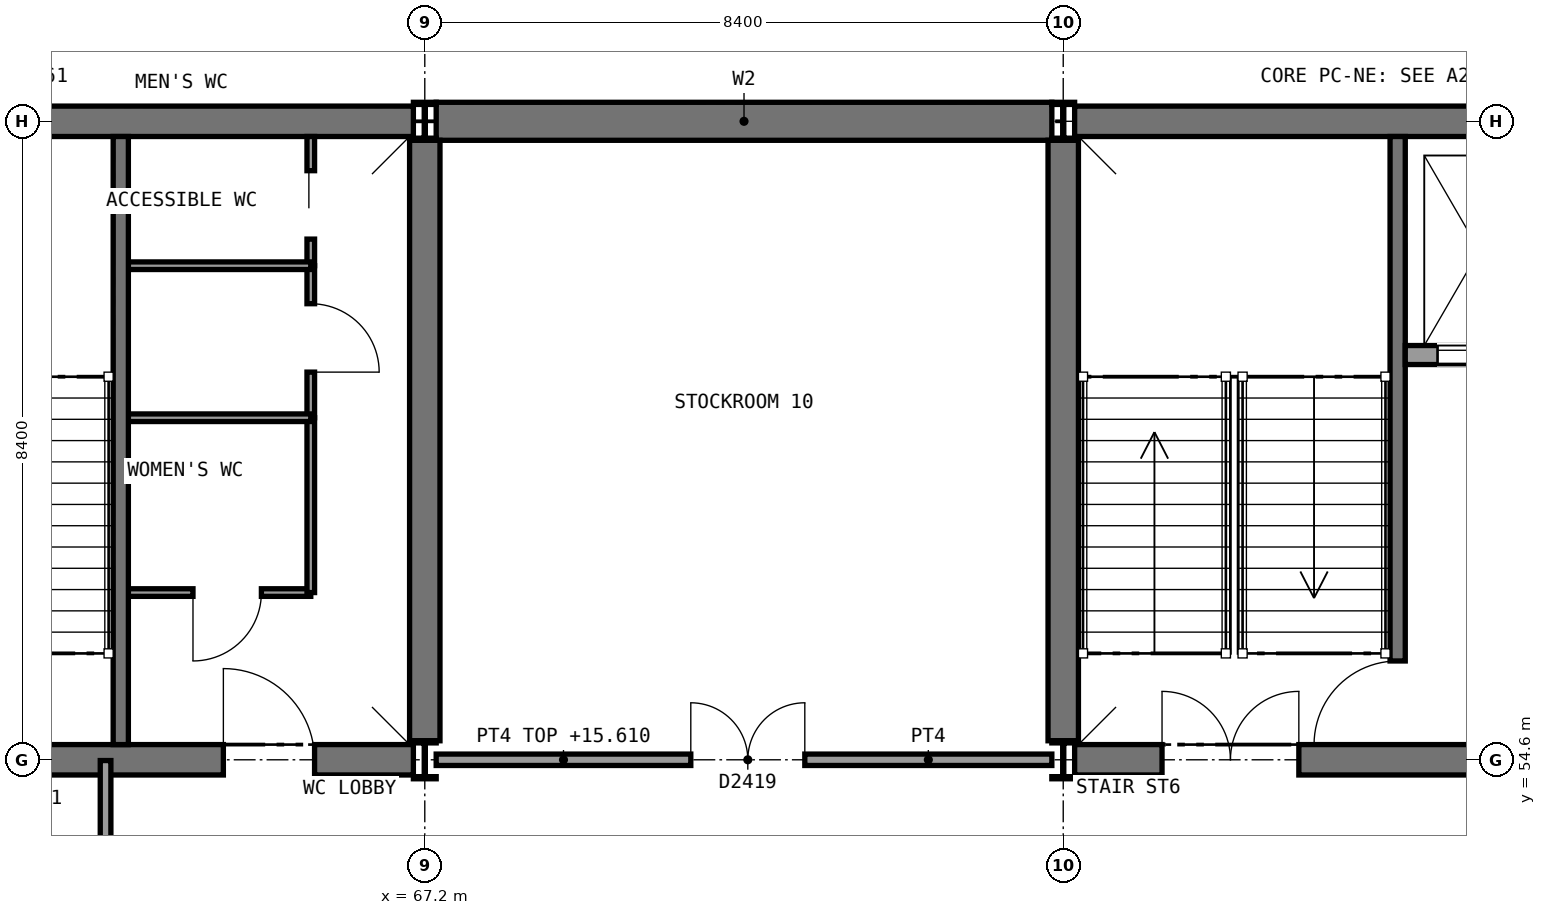
"""IFC4 building model, lengths in metres.
Left out: names, types, materials, properties, quantities, classifications, styles, units other than length and angle.
Written with IfcOpenShell. Run it as: python <this file> out.ifc"""

import sys

from ifc_helpers import new_model, si_unit, direction, frame, frame_2d, origin, origin_2d, place, context, subcontext, project, spatial, rectangle, i_section, extrude, element, fill, save


model = new_model("IFC4")
c1 = context("Model", 3, precision=1e-05, world=origin(), true_north=direction((0.0, 1.0)))
c2 = subcontext(c1, "Body", "Model", "MODEL_VIEW")
j1 = project(units=[si_unit("LENGTHUNIT", "METRE"), si_unit("PLANEANGLEUNIT", "RADIAN")], contexts=[c1])
p1 = place(None, origin())
s1 = spatial("IfcSite", under=j1, at=p1, CompositionType="ELEMENT")
p2 = place(p1, origin())
s2 = spatial("IfcBuilding", under=s1, at=p2, CompositionType="ELEMENT")
p3 = place(p2, frame((0.0, 0.0, 11.4)))
s3 = spatial("IfcBuildingStorey", under=s2, at=p3, CompositionType="ELEMENT", Elevation=11.4)
p4 = place(p3, frame((67.35, 63.0, 0.0), z_axis=(0.0, 0.0, 1.0), x_axis=(1.0, 0.0, 0.0)))
e1 = element("IfcWall", 1, at=p4, inside=s3, PredefinedType="SHEAR", context=c2, shape_type="SweptSolid", body=[
    extrude(rectangle(XDim=8.1, YDim=0.5, at=frame_2d((4.05, 0.0))), origin(), (0.0, 0.0, 1.0), 4.65),
])
p5 = place(p3, frame((75.75, 63.0, 0.0), z_axis=(0.0, 0.0, 1.0), x_axis=(1.0, 0.0, 0.0)))
e2 = element("IfcWall", 2, at=p5, inside=s3, PredefinedType="SHEAR", context=c2, shape_type="SweptSolid", body=[
    extrude(rectangle(XDim=8.097, YDim=0.4, at=frame_2d((4.048, 0.0))), origin(), (0.0, 0.0, 1.0), 4.65),
])
p6 = place(p3, frame((75.75, 54.6, 0.0), z_axis=(0.0, 0.0, 1.0), x_axis=(1.0, 0.0, 0.0)))
e3 = element("IfcWall", 3, at=p6, inside=s3, PredefinedType="SHEAR", context=c2, shape_type="SweptSolid", body=[
    extrude(rectangle(XDim=8.097, YDim=0.4, at=frame_2d((4.048, 0.0))), origin(), (0.0, 0.0, 1.0), 4.65),
])
p7 = place(p6, frame((1.15, 0.0, 0.0)))
e4 = element("IfcOpeningElement", 4, at=p7, cuts=e3, PredefinedType="OPENING", context=c2, shape_type="SweptSolid", body=[
    extrude(rectangle(XDim=1.8, YDim=2.1, at=frame_2d((0.9, 1.05))), frame((0.0, 0.21, 0.0), z_axis=(0.0, -1.0, 0.0), x_axis=(1.0, 0.0, 0.0)), (0.0, 0.0, 1.0), 0.42),
])
p8 = place(p6, frame((5.3, 0.0, 0.0)))
e5 = element("IfcOpeningElement", 5, at=p8, cuts=e3, PredefinedType="OPENING", context=c2, shape_type="SweptSolid", body=[
    extrude(rectangle(XDim=1.8, YDim=2.1, at=frame_2d((0.9, 1.05))), frame((0.0, 0.21, 0.0), z_axis=(0.0, -1.0, 0.0), x_axis=(1.0, 0.0, 0.0)), (0.0, 0.0, 1.0), 0.42),
])
p9 = place(p3, frame((75.6, 54.85, 0.0), z_axis=(0.0, 0.0, 1.0), x_axis=(0.0, 1.0, 0.0)))
e6 = element("IfcWall", 6, at=p9, inside=s3, PredefinedType="SHEAR", context=c2, shape_type="SweptSolid", body=[
    extrude(rectangle(XDim=7.9, YDim=0.4, at=frame_2d((3.95, 0.0))), origin(), (0.0, 0.0, 1.0), 4.65),
])
p10 = place(p3, frame((58.95, 63.0, 0.0), z_axis=(0.0, 0.0, 1.0), x_axis=(1.0, 0.0, 0.0)))
e7 = element("IfcWall", 7, at=p10, inside=s3, PredefinedType="SHEAR", context=c2, shape_type="SweptSolid", body=[
    extrude(rectangle(XDim=8.1, YDim=0.4, at=frame_2d((4.05, 0.0))), origin(), (0.0, 0.0, 1.0), 4.65),
])
p11 = place(p3, frame((58.95, 54.6, 0.0), z_axis=(0.0, 0.0, 1.0), x_axis=(1.0, 0.0, 0.0)))
e8 = element("IfcWall", 8, at=p11, inside=s3, PredefinedType="SHEAR", context=c2, shape_type="SweptSolid", body=[
    extrude(rectangle(XDim=8.1, YDim=0.4, at=frame_2d((4.05, 0.0))), origin(), (0.0, 0.0, 1.0), 4.65),
])
p12 = place(p11, frame((1.15, 0.0, 0.0)))
e9 = element("IfcOpeningElement", 9, at=p12, cuts=e8, PredefinedType="OPENING", context=c2, shape_type="SweptSolid", body=[
    extrude(rectangle(XDim=1.8, YDim=2.1, at=frame_2d((0.9, 1.05))), frame((0.0, 0.21, 0.0), z_axis=(0.0, -1.0, 0.0), x_axis=(1.0, 0.0, 0.0)), (0.0, 0.0, 1.0), 0.42),
])
p13 = place(p11, frame((5.6, 0.0, 0.0)))
e10 = element("IfcOpeningElement", 10, at=p13, cuts=e8, PredefinedType="OPENING", context=c2, shape_type="SweptSolid", body=[
    extrude(rectangle(XDim=1.2, YDim=2.1, at=frame_2d((0.6, 1.05))), frame((0.0, 0.21, 0.0), z_axis=(0.0, -1.0, 0.0), x_axis=(1.0, 0.0, 0.0)), (0.0, 0.0, 1.0), 0.42),
])
p14 = place(p3, frame((67.2, 54.85, 0.0), z_axis=(0.0, 0.0, 1.0), x_axis=(0.0, 1.0, 0.0)))
e11 = element("IfcWall", 11, at=p14, inside=s3, PredefinedType="SHEAR", context=c2, shape_type="SweptSolid", body=[
    extrude(rectangle(XDim=7.9, YDim=0.4, at=frame_2d((3.95, 0.0))), origin(), (0.0, 0.0, 1.0), 4.65),
])
for number, where, z_axis, x_axis in (
    (12, (67.2, 54.6, 0.0), (0.0, 0.0, 1.0), (1.0, 0.0, 0.0)),
    (13, (67.2, 63.0, 0.0), (0.0, 0.0, 1.0), (1.0, 0.0, 0.0)),
    (14, (75.6, 54.6, 0.0), (0.0, 0.0, 1.0), (1.0, 0.0, 0.0)),
    (15, (75.6, 63.0, 0.0), (0.0, 0.0, 1.0), (1.0, 0.0, 0.0)),
):
    element("IfcColumn", number, at=place(p3, frame(where, z_axis=z_axis, x_axis=x_axis)), inside=s3, PredefinedType="COLUMN", context=c2, shape_type="SweptSolid", body=[
        extrude(i_section(OverallWidth=0.3, OverallDepth=0.5, WebThickness=0.014, FlangeThickness=0.028, FilletRadius=0.027, at=origin_2d()), origin(), (0.0, 0.0, 1.0), 4.8),
    ])
p15 = place(p3, frame((63.3, 56.8, 0.0), z_axis=(0.0, 0.0, 1.0), x_axis=(1.0, 0.0, 0.0)))
e16 = element("IfcWall", 16, at=p15, inside=s3, PredefinedType="PARTITIONING", context=c2, shape_type="SweptSolid", body=[
    extrude(rectangle(XDim=2.4, YDim=0.1, at=frame_2d((1.2, 0.0))), origin(), (0.0, 0.0, 1.0), 4.58),
])
p16 = place(p15, frame((0.85, 0.0, 0.0)))
e17 = element("IfcOpeningElement", 17, at=p16, cuts=e16, PredefinedType="OPENING", context=c2, shape_type="SweptSolid", body=[
    extrude(rectangle(XDim=0.9, YDim=2.1, at=frame_2d((0.45, 1.05))), frame((0.0, 0.06, 0.0), z_axis=(0.0, -1.0, 0.0), x_axis=(1.0, 0.0, 0.0)), (0.0, 0.0, 1.0), 0.12),
])
p17 = place(p3, frame((65.7, 56.8, 0.0), z_axis=(0.0, 0.0, 1.0), x_axis=(0.0, 1.0, 0.0)))
e18 = element("IfcWall", 18, at=p17, inside=s3, PredefinedType="PARTITIONING", context=c2, shape_type="SweptSolid", body=[
    extrude(rectangle(XDim=2.3, YDim=0.1, at=frame_2d((1.15, 0.0))), origin(), (0.0, 0.0, 1.0), 4.58),
])
p18 = place(p3, frame((65.7, 59.1, 0.0), z_axis=(0.0, 0.0, 1.0), x_axis=(0.0, 1.0, 0.0)))
e19 = element("IfcWall", 19, at=p18, inside=s3, PredefinedType="PARTITIONING", context=c2, shape_type="SweptSolid", body=[
    extrude(rectangle(XDim=2.0, YDim=0.1, at=frame_2d((1.0, 0.0))), origin(), (0.0, 0.0, 1.0), 4.58),
])
p19 = place(p18, frame((0.6, 0.0, 0.0)))
e20 = element("IfcOpeningElement", 20, at=p19, cuts=e19, PredefinedType="OPENING", context=c2, shape_type="SweptSolid", body=[
    extrude(rectangle(XDim=0.9, YDim=2.1, at=frame_2d((0.45, 1.05))), frame((0.0, 0.06, 0.0), z_axis=(0.0, -1.0, 0.0), x_axis=(1.0, 0.0, 0.0)), (0.0, 0.0, 1.0), 0.12),
])
p20 = place(p3, frame((65.7, 61.1, 0.0), z_axis=(0.0, 0.0, 1.0), x_axis=(0.0, 1.0, 0.0)))
e21 = element("IfcWall", 21, at=p20, inside=s3, PredefinedType="PARTITIONING", context=c2, shape_type="SweptSolid", body=[
    extrude(rectangle(XDim=1.7, YDim=0.1, at=frame_2d((0.85, 0.0))), origin(), (0.0, 0.0, 1.0), 4.58),
])
p21 = place(p20, frame((0.35, 0.0, 0.0)))
e22 = element("IfcOpeningElement", 22, at=p21, cuts=e21, PredefinedType="OPENING", context=c2, shape_type="SweptSolid", body=[
    extrude(rectangle(XDim=0.9, YDim=2.1, at=frame_2d((0.45, 1.05))), frame((0.0, 0.06, 0.0), z_axis=(0.0, -1.0, 0.0), x_axis=(1.0, 0.0, 0.0)), (0.0, 0.0, 1.0), 0.12),
])
for number, where, z_axis, x_axis in (
    (23, (63.3, 59.1, 0.0), (0.0, 0.0, 1.0), (1.0, 0.0, 0.0)),
    (24, (63.3, 61.1, 0.0), (0.0, 0.0, 1.0), (1.0, 0.0, 0.0)),
):
    element("IfcWall", number, at=place(p3, frame(where, z_axis=z_axis, x_axis=x_axis)), inside=s3, PredefinedType="PARTITIONING", context=c2, shape_type="SweptSolid", body=[
        extrude(rectangle(XDim=2.4, YDim=0.1, at=frame_2d((1.2, 0.0))), origin(), (0.0, 0.0, 1.0), 4.58),
    ])
p22 = place(p3, frame((67.35, 54.6, 0.0), z_axis=(0.0, 0.0, 1.0), x_axis=(1.0, 0.0, 0.0)))
e25 = element("IfcWall", 25, at=p22, inside=s3, PredefinedType="SOLIDWALL", context=c2, shape_type="SweptSolid", body=[
    extrude(rectangle(XDim=8.1, YDim=0.15, at=frame_2d((4.05, 0.0))), origin(), (0.0, 0.0, 1.0), 4.21),
])
p23 = place(p22, frame((3.35, 0.0, 0.0)))
e26 = element("IfcOpeningElement", 26, at=p23, cuts=e25, PredefinedType="OPENING", context=c2, shape_type="SweptSolid", body=[
    extrude(rectangle(XDim=1.5, YDim=2.1, at=frame_2d((0.75, 1.05))), frame((0.0, 0.085, 0.0), z_axis=(0.0, -1.0, 0.0), x_axis=(1.0, 0.0, 0.0)), (0.0, 0.0, 1.0), 0.17),
])
p24 = place(p3, frame((63.0, 47.2, 0.0), z_axis=(0.0, 0.0, 1.0), x_axis=(0.0, 1.0, 0.0)))
e27 = element("IfcWall", 27, at=p24, inside=s3, PredefinedType="PARTITIONING", context=c2, shape_type="SweptSolid", body=[
    extrude(rectangle(XDim=7.39, YDim=0.14, at=frame_2d((3.695, 0.0))), origin(), (0.0, 0.0, 1.0), 4.65),
])
p25 = place(p3, frame((80.0, 62.8, 0.0), z_axis=(0.0, 0.0, 1.0), x_axis=(0.0, -1.0, 0.0)))
e28 = element("IfcWall", 28, at=p25, inside=s3, PredefinedType="SHEAR", context=c2, shape_type="SweptSolid", body=[
    extrude(rectangle(XDim=8.0, YDim=0.2, at=frame_2d((4.0, 0.0))), origin(), (0.0, 0.0, 1.0), 4.65),
])
p26 = place(p25, frame((6.9, 0.0, 0.0)))
e29 = element("IfcOpeningElement", 29, at=p26, cuts=e28, PredefinedType="OPENING", context=c2, shape_type="SweptSolid", body=[
    extrude(rectangle(XDim=1.11, YDim=2.1, at=frame_2d((0.555, 1.05))), frame((0.0, 0.11, 0.0), z_axis=(0.0, -1.0, 0.0), x_axis=(1.0, 0.0, 0.0)), (0.0, 0.0, 1.0), 0.22),
])
p27 = place(p3, frame((80.1, 59.925, 0.0), z_axis=(0.0, 0.0, 1.0), x_axis=(1.0, 0.0, 0.0)))
e30 = element("IfcWall", 30, at=p27, inside=s3, PredefinedType="SOLIDWALL", context=c2, shape_type="SweptSolid", body=[
    extrude(rectangle(XDim=1.95, YDim=0.25, at=frame_2d((0.975, 0.0))), origin(), (0.0, 0.0, 1.0), 4.8),
])
p28 = place(p27, frame((0.425, 0.0, 0.0)))
e31 = element("IfcOpeningElement", 31, at=p28, cuts=e30, PredefinedType="OPENING", context=c2, shape_type="SweptSolid", body=[
    extrude(rectangle(XDim=1.1, YDim=2.1, at=frame_2d((0.55, 1.05))), frame((0.0, 0.135, 0.0), z_axis=(0.0, -1.0, 0.0), x_axis=(1.0, 0.0, 0.0)), (0.0, 0.0, 1.0), 0.27),
])
p29 = place(p3, frame((63.2, 62.8, 0.0), z_axis=(0.0, 0.0, 1.0), x_axis=(0.0, -1.0, 0.0)))
e32 = element("IfcWall", 32, at=p29, inside=s3, PredefinedType="SHEAR", context=c2, shape_type="SweptSolid", body=[
    extrude(rectangle(XDim=8.0, YDim=0.2, at=frame_2d((4.0, 0.0))), origin(), (0.0, 0.0, 1.0), 4.65),
])
p30 = place(p16, frame((0.9, 0.0, 0.0), z_axis=(0.0, 0.0, 1.0), x_axis=(-1.0, 0.0, 0.0)))
e33 = element("IfcDoor", 33, at=p30, inside=s3, OperationType="SINGLE_SWING_RIGHT", PredefinedType="DOOR", context=c2, shape_type="SweptSolid", body=[
    extrude(rectangle(XDim=0.9, YDim=2.1, at=frame_2d((0.45, 1.05))), frame((0.0, 0.025, 0.0), z_axis=(0.0, -1.0, 0.0), x_axis=(1.0, 0.0, 0.0)), (0.0, 0.0, 1.0), 0.05),
])
fill(e17, e33)
p31 = place(p19, frame((0.9, 0.0, 0.0), z_axis=(0.0, 0.0, 1.0), x_axis=(-1.0, 0.0, 0.0)))
e34 = element("IfcDoor", 34, at=p31, inside=s3, OperationType="SINGLE_SWING_RIGHT", PredefinedType="DOOR", context=c2, shape_type="SweptSolid", body=[
    extrude(rectangle(XDim=0.9, YDim=2.1, at=frame_2d((0.45, 1.05))), frame((0.0, 0.025, 0.0), z_axis=(0.0, -1.0, 0.0), x_axis=(1.0, 0.0, 0.0)), (0.0, 0.0, 1.0), 0.05),
])
fill(e20, e34)
p32 = place(p21, origin())
e35 = element("IfcDoor", 35, at=p32, inside=s3, OperationType="SLIDING_TO_RIGHT", PredefinedType="DOOR", context=c2, shape_type="SweptSolid", body=[
    extrude(rectangle(XDim=0.9, YDim=2.1, at=frame_2d((0.45, 1.05))), frame((0.0, 0.025, 0.0), z_axis=(0.0, -1.0, 0.0), x_axis=(1.0, 0.0, 0.0)), (0.0, 0.0, 1.0), 0.05),
])
fill(e22, e35)
p33 = place(p23, origin())
e36 = element("IfcDoor", 36, at=p33, inside=s3, OperationType="DOUBLE_DOOR_SINGLE_SWING", PredefinedType="DOOR", context=c2, shape_type="SweptSolid", body=[
    extrude(rectangle(XDim=1.5, YDim=2.1, at=frame_2d((0.75, 1.05))), frame((0.0, 0.025, 0.0), z_axis=(0.0, -1.0, 0.0), x_axis=(1.0, 0.0, 0.0)), (0.0, 0.0, 1.0), 0.05),
])
fill(e26, e36)
p34 = place(p26, frame((1.1, 0.0, 0.0), z_axis=(0.0, 0.0, 1.0), x_axis=(-1.0, 0.0, 0.0)))
e37 = element("IfcDoor", 37, at=p34, inside=s3, OperationType="SINGLE_SWING_LEFT", PredefinedType="DOOR", context=c2, shape_type="SweptSolid", body=[
    extrude(rectangle(XDim=1.1, YDim=2.1, at=frame_2d((0.55, 1.05))), frame((0.0, 0.025, 0.0), z_axis=(0.0, -1.0, 0.0), x_axis=(1.0, 0.0, 0.0)), (0.0, 0.0, 1.0), 0.05),
])
fill(e29, e37)
p35 = place(p28, frame((1.1, 0.0, 0.0), z_axis=(0.0, 0.0, 1.0), x_axis=(-1.0, 0.0, 0.0)))
e38 = element("IfcDoor", 38, at=p35, inside=s3, OperationType="SLIDING_TO_RIGHT", PredefinedType="DOOR", context=c2, shape_type="SweptSolid", body=[
    extrude(rectangle(XDim=1.1, YDim=2.1, at=frame_2d((0.55, 1.05))), frame((0.0, 0.025, 0.0), z_axis=(0.0, -1.0, 0.0), x_axis=(1.0, 0.0, 0.0)), (0.0, 0.0, 1.0), 0.05),
])
fill(e31, e38)
p36 = place(p7, origin())
e39 = element("IfcDoor", 39, at=p36, inside=s3, OperationType="DOUBLE_DOOR_SINGLE_SWING", PredefinedType="DOOR", context=c2, shape_type="SweptSolid", body=[
    extrude(rectangle(XDim=1.8, YDim=2.1, at=frame_2d((0.9, 1.05))), frame((0.0, 0.025, 0.0), z_axis=(0.0, -1.0, 0.0), x_axis=(1.0, 0.0, 0.0)), (0.0, 0.0, 1.0), 0.05),
])
fill(e4, e39)
p37 = place(p13, origin())
e40 = element("IfcDoor", 40, at=p37, inside=s3, OperationType="SINGLE_SWING_LEFT", PredefinedType="DOOR", context=c2, shape_type="SweptSolid", body=[
    extrude(rectangle(XDim=1.2, YDim=2.1, at=frame_2d((0.6, 1.05))), frame((0.0, 0.025, 0.0), z_axis=(0.0, -1.0, 0.0), x_axis=(1.0, 0.0, 0.0)), (0.0, 0.0, 1.0), 0.05),
])
fill(e10, e40)
save(model, sys.argv[1])
